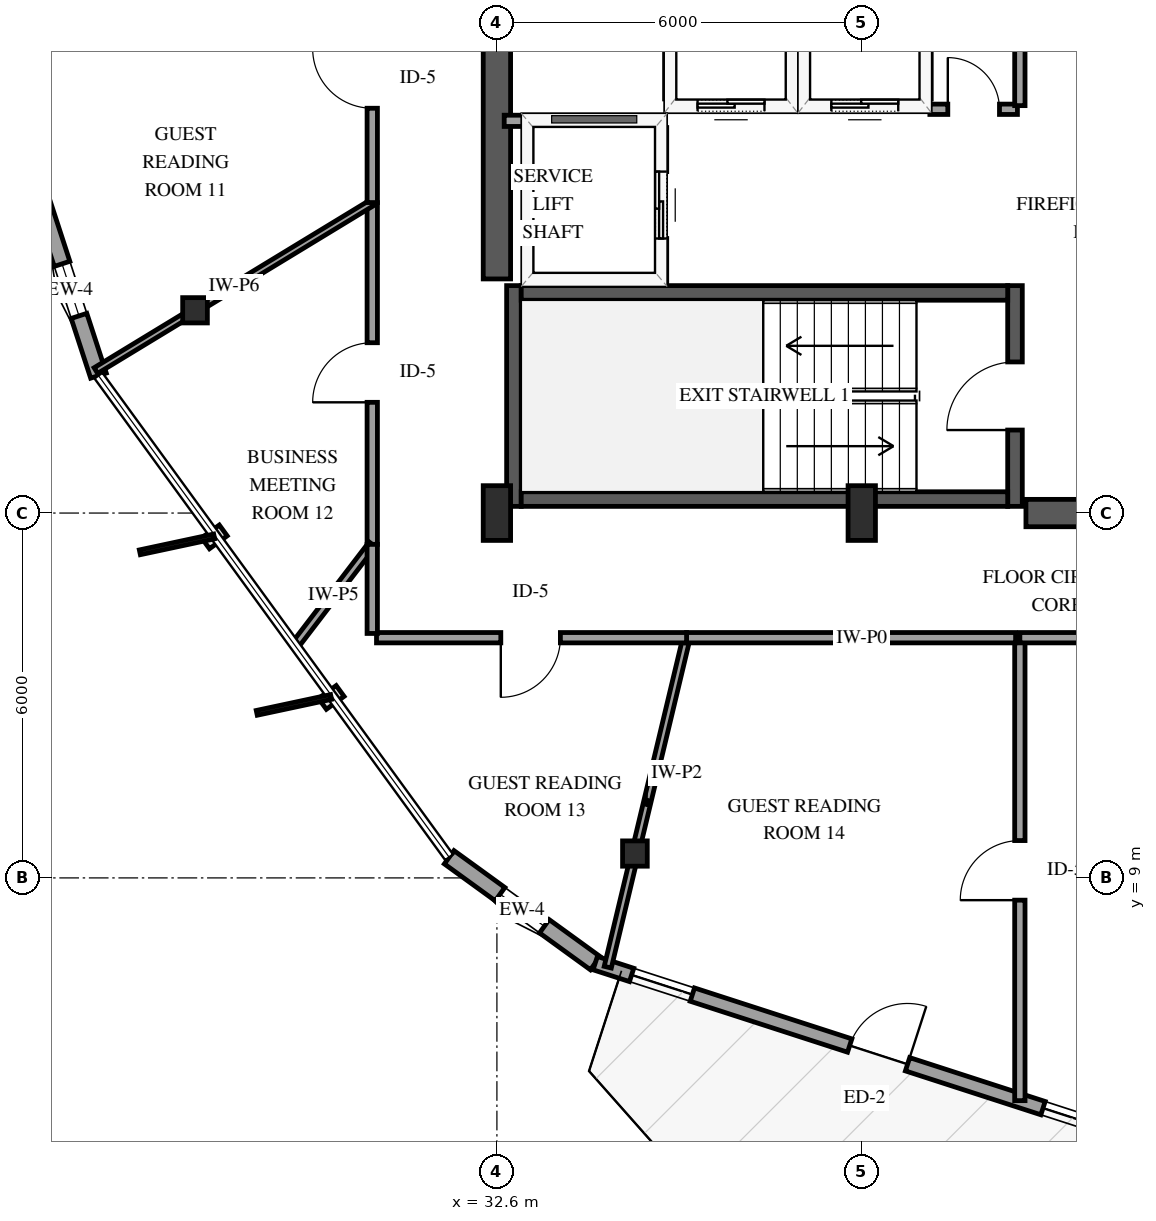
"""IFC4 building model, lengths in metres.
Left out: names, types, materials, properties, quantities, classifications, styles, units other than length and angle.
Written with IfcOpenShell. Run it as: python <this file> out.ifc"""

import sys

from ifc_helpers import new_model, si_unit, direction, frame, frame_2d, origin, origin_2d, place, context, subcontext, project, spatial, rectangle, i_section, extrude, element, fill, save


model = new_model("IFC4")
c1 = context("Model", 3, precision=1e-05, world=origin(), true_north=direction((0.0, 1.0)))
c2 = subcontext(c1, "Body", "Model", "MODEL_VIEW")
j1 = project(units=[si_unit("LENGTHUNIT", "METRE"), si_unit("PLANEANGLEUNIT", "RADIAN")], contexts=[c1])
p1 = place(None, origin())
s1 = spatial("IfcSite", under=j1, at=p1, CompositionType="ELEMENT")
p2 = place(p1, origin())
s2 = spatial("IfcBuilding", under=s1, at=p2, CompositionType="ELEMENT")
p3 = place(p2, frame((0.0, 0.0, 230.2)))
s3 = spatial("IfcBuildingStorey", under=s2, at=p3, CompositionType="ELEMENT", Elevation=230.2)
p4 = place(p3, frame((32.88, 15.11, 0.0), z_axis=(0.0, 0.0, 1.0), x_axis=(0.0, 1.0, 0.0)))
e1 = element("IfcWall", 1, at=p4, inside=s3, PredefinedType="SHEAR", context=c2, shape_type="SweptSolid", body=[
    extrude(rectangle(XDim=3.63, YDim=0.24, at=frame_2d((1.815, 0.0))), origin(), (0.0, 0.0, 1.0), 3.6),
])
p5 = place(p3, frame((41.12, 15.11, 0.0), z_axis=(0.0, 0.0, 1.0), x_axis=(0.0, 1.0, 0.0)))
e2 = element("IfcWall", 2, at=p5, inside=s3, PredefinedType="SHEAR", context=c2, shape_type="SweptSolid", body=[
    extrude(rectangle(XDim=3.63, YDim=0.24, at=frame_2d((1.815, 0.0))), origin(), (0.0, 0.0, 1.0), 3.6),
])
p6 = place(p5, frame((1.255, 0.0, 0.0)))
e3 = element("IfcOpeningElement", 3, at=p6, cuts=e2, PredefinedType="OPENING", context=c2, shape_type="SweptSolid", body=[
    extrude(rectangle(XDim=1.12, YDim=2.15, at=frame_2d((0.56, 1.075))), frame((0.0, 0.13, 0.0), z_axis=(0.0, -1.0, 0.0), x_axis=(1.0, 0.0, 0.0)), (0.0, 0.0, 1.0), 0.26),
])
for number, where, z_axis, x_axis in (
    (4, (33.0, 15.23, 0.0), (0.0, 0.0, 1.0), (1.0, 0.0, 0.0)),
    (5, (33.0, 18.62, 0.0), (0.0, 0.0, 1.0), (1.0, 0.0, 0.0)),
):
    element("IfcWall", number, at=place(p3, frame(where, z_axis=z_axis, x_axis=x_axis)), inside=s3, PredefinedType="SHEAR", context=c2, shape_type="SweptSolid", body=[
        extrude(rectangle(XDim=8.0, YDim=0.24, at=frame_2d((4.0, 0.0))), origin(), (0.0, 0.0, 1.0), 3.6),
    ])
p7 = place(p3, frame((32.6, 18.85, 0.0), z_axis=(0.0, 0.0, 1.0), x_axis=(0.0, 1.0, 0.0)))
e6 = element("IfcWall", 6, at=p7, inside=s3, PredefinedType="SHEAR", context=c2, shape_type="SweptSolid", body=[
    extrude(rectangle(XDim=12.3, YDim=0.45, at=frame_2d((6.15, 0.0))), origin(), (0.0, 0.0, 1.0), 3.6),
])
p8 = place(p3, frame((41.3, 15.0, 0.0), z_axis=(0.0, 0.0, 1.0), x_axis=(1.0, 0.0, 0.0)))
e7 = element("IfcWall", 7, at=p8, inside=s3, PredefinedType="SHEAR", context=c2, shape_type="SweptSolid", body=[
    extrude(rectangle(XDim=2.85, YDim=0.45, at=frame_2d((1.425, 0.0))), origin(), (0.0, 0.0, 1.0), 3.6),
])
for number, where, z_axis, x_axis in (
    (8, (32.6, 15.0, 0.0), (0.0, 0.0, 1.0), (1.0, 0.0, 0.0)),
    (9, (38.6, 15.0, 0.0), (0.0, 0.0, 1.0), (1.0, 0.0, 0.0)),
):
    element("IfcColumn", number, at=place(p3, frame(where, z_axis=z_axis, x_axis=x_axis)), inside=s3, PredefinedType="PILASTER", context=c2, shape_type="SweptSolid", body=[
        extrude(rectangle(XDim=0.45, YDim=0.9, at=origin_2d()), origin(), (0.0, 0.0, 1.0), 3.6),
    ])
for number, where, z_axis, x_axis in (
    (10, (27.635, 18.334, 0.0), (0.0, 0.0, 1.0), (1.0, 0.0, 0.0)),
    (11, (34.87, 9.401, 0.0), (0.0, 0.0, 1.0), (1.0, 0.0, 0.0)),
):
    element("IfcColumn", number, at=place(p3, frame(where, z_axis=z_axis, x_axis=x_axis)), inside=s3, PredefinedType="COLUMN", context=c2, shape_type="SweptSolid", body=[
        extrude(i_section(OverallWidth=0.406, OverallDepth=0.416, WebThickness=0.03, FlangeThickness=0.048, FilletRadius=0.038, at=origin_2d()), origin(), (0.0, 0.0, 1.0), 3.6),
    ])
p9 = place(p3, frame((25.128, 20.08, 0.0), z_axis=(0.0, 0.0, 1.0), x_axis=(0.309949441634, -0.950753040295, 0.0)))
e12 = element("IfcWall", 12, at=p9, inside=s3, PredefinedType="SOLIDWALL", context=c2, shape_type="SweptSolid", body=[
    extrude(rectangle(XDim=2.966, YDim=0.27, at=frame_2d((1.483, 0.0))), origin(), (0.0, 0.0, 1.0), 2.679),
])
p10 = place(p9, frame((1.033, 0.0, 0.75)))
e13 = element("IfcOpeningElement", 13, at=p10, cuts=e12, PredefinedType="OPENING", context=c2, shape_type="SweptSolid", body=[
    extrude(rectangle(XDim=0.9, YDim=1.5, at=frame_2d((0.45, 0.75))), frame((0.0, 0.145, 0.0), z_axis=(0.0, -1.0, 0.0), x_axis=(1.0, 0.0, 0.0)), (0.0, 0.0, 1.0), 0.29),
])
p11 = place(p3, frame((31.815, 9.34, 0.0), z_axis=(0.0, 0.0, 1.0), x_axis=(0.809631952519, -0.586937902558, 0.0)))
e14 = element("IfcWall", 14, at=p11, inside=s3, PredefinedType="SOLIDWALL", context=c2, shape_type="SweptSolid", body=[
    extrude(rectangle(XDim=2.967, YDim=0.27, at=frame_2d((1.483, 0.0))), origin(), (0.0, 0.0, 1.0), 2.679),
])
p12 = place(p11, frame((1.033, 0.0, 0.75)))
e15 = element("IfcOpeningElement", 15, at=p12, cuts=e14, PredefinedType="OPENING", context=c2, shape_type="SweptSolid", body=[
    extrude(rectangle(XDim=0.9, YDim=1.5, at=frame_2d((0.45, 0.75))), frame((0.0, 0.145, 0.0), z_axis=(0.0, -1.0, 0.0), x_axis=(1.0, 0.0, 0.0)), (0.0, 0.0, 1.0), 0.29),
])
p13 = place(p3, frame((34.217, 7.598, 0.0), z_axis=(0.0, 0.0, 1.0), x_axis=(0.951374090692, -0.308037886567, 0.0)))
e16 = element("IfcWall", 16, at=p13, inside=s3, PredefinedType="SOLIDWALL", context=c2, shape_type="SweptSolid", body=[
    extrude(rectangle(XDim=9.798, YDim=0.23, at=frame_2d((4.899, 0.0))), origin(), (0.0, 0.0, 1.0), 2.679),
])
p14 = place(p13, frame((4.399, 0.0, 0.0)))
e17 = element("IfcOpeningElement", 17, at=p14, cuts=e16, PredefinedType="OPENING", context=c2, shape_type="SweptSolid", body=[
    extrude(rectangle(XDim=1.0, YDim=2.15, at=frame_2d((0.5, 1.075))), frame((0.0, 0.125, 0.0), z_axis=(0.0, -1.0, 0.0), x_axis=(1.0, 0.0, 0.0)), (0.0, 0.0, 1.0), 0.25),
])
p15 = place(p13, frame((0.629, 0.0, 0.72)))
e18 = element("IfcOpeningElement", 18, at=p15, cuts=e16, PredefinedType="OPENING", context=c2, shape_type="SweptSolid", body=[
    extrude(rectangle(XDim=1.05, YDim=1.55, at=frame_2d((0.525, 0.775))), frame((0.0, 0.125, 0.0), z_axis=(0.0, -1.0, 0.0), x_axis=(1.0, 0.0, 0.0)), (0.0, 0.0, 1.0), 0.25),
])
p16 = place(p13, frame((7.74, 0.0, 0.72)))
e19 = element("IfcOpeningElement", 19, at=p16, cuts=e16, PredefinedType="OPENING", context=c2, shape_type="SweptSolid", body=[
    extrude(rectangle(XDim=1.05, YDim=1.55, at=frame_2d((0.525, 0.775))), frame((0.0, 0.125, 0.0), z_axis=(0.0, -1.0, 0.0), x_axis=(1.0, 0.0, 0.0)), (0.0, 0.0, 1.0), 0.25),
])
p17 = place(p3, frame((35.45, 21.7, 0.0), z_axis=(0.0, 0.0, 1.0), x_axis=(1.0, 0.0, 0.0)))
e20 = element("IfcWall", 20, at=p17, inside=s3, PredefinedType="SOLIDWALL", context=c2, shape_type="SweptSolid", body=[
    extrude(rectangle(XDim=2.0, YDim=0.185, at=frame_2d((1.0, 0.0))), origin(), (0.0, 0.0, 1.0), 3.3),
])
p18 = place(p17, frame((0.45, 0.0, 0.0)))
e21 = element("IfcOpeningElement", 21, at=p18, cuts=e20, PredefinedType="OPENING", context=c2, shape_type="SweptSolid", body=[
    extrude(rectangle(XDim=1.1, YDim=2.15, at=frame_2d((0.55, 1.075))), frame((0.0, 0.103, 0.0), z_axis=(0.0, -1.0, 0.0), x_axis=(1.0, 0.0, 0.0)), (0.0, 0.0, 1.0), 0.205),
])
for number, where, z_axis, x_axis in (
    (22, (35.45, 21.81, 0.0), (0.0, 0.0, 1.0), (0.0, 1.0, 0.0)),
    (23, (37.45, 21.81, 0.0), (0.0, 0.0, 1.0), (0.0, 1.0, 0.0)),
):
    element("IfcWall", number, at=place(p3, frame(where, z_axis=z_axis, x_axis=x_axis)), inside=s3, PredefinedType="SOLIDWALL", context=c2, shape_type="SweptSolid", body=[
        extrude(rectangle(XDim=2.38, YDim=0.185, at=frame_2d((1.19, 0.0))), origin(), (0.0, 0.0, 1.0), 3.3),
    ])
p19 = place(p3, frame((37.65, 21.7, 0.0), z_axis=(0.0, 0.0, 1.0), x_axis=(1.0, 0.0, 0.0)))
e24 = element("IfcWall", 24, at=p19, inside=s3, PredefinedType="SOLIDWALL", context=c2, shape_type="SweptSolid", body=[
    extrude(rectangle(XDim=2.0, YDim=0.185, at=frame_2d((1.0, 0.0))), origin(), (0.0, 0.0, 1.0), 3.3),
])
p20 = place(p19, frame((0.45, 0.0, 0.0)))
e25 = element("IfcOpeningElement", 25, at=p20, cuts=e24, PredefinedType="OPENING", context=c2, shape_type="SweptSolid", body=[
    extrude(rectangle(XDim=1.1, YDim=2.15, at=frame_2d((0.55, 1.075))), frame((0.0, 0.103, 0.0), z_axis=(0.0, -1.0, 0.0), x_axis=(1.0, 0.0, 0.0)), (0.0, 0.0, 1.0), 0.205),
])
p21 = place(p3, frame((39.65, 21.81, 0.0), z_axis=(0.0, 0.0, 1.0), x_axis=(0.0, 1.0, 0.0)))
e26 = element("IfcWall", 26, at=p21, inside=s3, PredefinedType="SOLIDWALL", context=c2, shape_type="SweptSolid", body=[
    extrude(rectangle(XDim=2.38, YDim=0.185, at=frame_2d((1.19, 0.0))), origin(), (0.0, 0.0, 1.0), 3.3),
])
p22 = place(p3, frame((32.72, 21.45, 0.0), z_axis=(0.0, 0.0, 1.0), x_axis=(1.0, 0.0, 0.0)))
e27 = element("IfcWall", 27, at=p22, inside=s3, PredefinedType="SOLIDWALL", context=c2, shape_type="SweptSolid", body=[
    extrude(rectangle(XDim=2.58, YDim=0.185, at=frame_2d((1.29, 0.0))), origin(), (0.0, 0.0, 1.0), 3.3),
])
p23 = place(p3, frame((35.3, 18.79, 0.0), z_axis=(0.0, 0.0, 1.0), x_axis=(0.0, 1.0, 0.0)))
e28 = element("IfcWall", 28, at=p23, inside=s3, PredefinedType="SOLIDWALL", context=c2, shape_type="SweptSolid", body=[
    extrude(rectangle(XDim=2.55, YDim=0.185, at=frame_2d((1.275, 0.0))), origin(), (0.0, 0.0, 1.0), 3.3),
])
p24 = place(p23, frame((0.725, 0.0, 0.0)))
e29 = element("IfcOpeningElement", 29, at=p24, cuts=e28, PredefinedType="OPENING", context=c2, shape_type="SweptSolid", body=[
    extrude(rectangle(XDim=1.1, YDim=2.15, at=frame_2d((0.55, 1.075))), frame((0.0, 0.103, 0.0), z_axis=(0.0, -1.0, 0.0), x_axis=(1.0, 0.0, 0.0)), (0.0, 0.0, 1.0), 0.205),
])
p25 = place(p3, frame((41.2, 5.337, 0.0), z_axis=(0.0, 0.0, 1.0), x_axis=(0.0, 1.0, 0.0)))
e30 = element("IfcWall", 30, at=p25, inside=s3, PredefinedType="PARTITIONING", context=c2, shape_type="SweptSolid", body=[
    extrude(rectangle(XDim=7.543, YDim=0.17, at=frame_2d((3.771, 0.0))), origin(), (0.0, 0.0, 1.0), 3.3),
])
p26 = place(p25, frame((3.297, 0.0, 0.0)))
e31 = element("IfcOpeningElement", 31, at=p26, cuts=e30, PredefinedType="OPENING", context=c2, shape_type="SweptSolid", body=[
    extrude(rectangle(XDim=0.98, YDim=2.15, at=frame_2d((0.49, 1.075))), frame((0.0, 0.095, 0.0), z_axis=(0.0, -1.0, 0.0), x_axis=(1.0, 0.0, 0.0)), (0.0, 0.0, 1.0), 0.19),
])
p27 = place(p3, frame((30.55, 14.485, 0.0), z_axis=(0.0, 0.0, 1.0), x_axis=(0.0, 1.0, 0.0)))
e32 = element("IfcWall", 32, at=p27, inside=s3, PredefinedType="PARTITIONING", context=c2, shape_type="SweptSolid", body=[
    extrude(rectangle(XDim=5.621, YDim=0.17, at=frame_2d((2.811, 0.0))), origin(), (0.0, 0.0, 1.0), 3.3),
])
p28 = place(p27, frame((2.336, 0.0, 0.0)))
e33 = element("IfcOpeningElement", 33, at=p28, cuts=e32, PredefinedType="OPENING", context=c2, shape_type="SweptSolid", body=[
    extrude(rectangle(XDim=0.98, YDim=2.15, at=frame_2d((0.49, 1.075))), frame((0.0, 0.095, 0.0), z_axis=(0.0, -1.0, 0.0), x_axis=(1.0, 0.0, 0.0)), (0.0, 0.0, 1.0), 0.19),
])
p29 = place(p3, frame((35.719, 12.95, 0.0), z_axis=(0.0, 0.0, 1.0), x_axis=(-0.232623679373, -0.972566822277, 0.0)))
e34 = element("IfcWall", 34, at=p29, inside=s3, PredefinedType="PARTITIONING", context=c2, shape_type="SweptSolid", body=[
    extrude(rectangle(XDim=5.571, YDim=0.12, at=frame_2d((2.785, 0.0))), origin(), (0.0, 0.0, 1.0), 2.595),
])
p30 = place(p3, frame((41.13, 12.95, 0.0), z_axis=(0.0, 0.0, 1.0), x_axis=(-1.0, 0.0, 0.0)))
e35 = element("IfcWall", 35, at=p30, inside=s3, PredefinedType="PARTITIONING", context=c2, shape_type="SweptSolid", body=[
    extrude(rectangle(XDim=5.411, YDim=0.17, at=frame_2d((2.706, 0.0))), origin(), (0.0, 0.0, 1.0), 3.3),
])
p31 = place(p3, frame((46.58, 12.95, 0.0), z_axis=(0.0, 0.0, 1.0), x_axis=(-1.0, 0.0, 0.0)))
e36 = element("IfcWall", 36, at=p31, inside=s3, PredefinedType="PARTITIONING", context=c2, shape_type="SweptSolid", body=[
    extrude(rectangle(XDim=5.38, YDim=0.17, at=frame_2d((2.69, 0.0))), origin(), (0.0, 0.0, 1.0), 3.3),
])
p32 = place(p3, frame((30.55, 20.106, 0.0), z_axis=(0.0, 0.0, 1.0), x_axis=(-0.854505962671, -0.519441584549, 0.0)))
e37 = element("IfcWall", 37, at=p32, inside=s3, PredefinedType="PARTITIONING", context=c2, shape_type="SweptSolid", body=[
    extrude(rectangle(XDim=5.319, YDim=0.11, at=frame_2d((2.66, 0.0))), origin(), (0.0, 0.0, 1.0), 2.678),
])
p33 = place(p3, frame((35.719, 12.95, 0.0), z_axis=(0.0, 0.0, 1.0), x_axis=(-1.0, 0.0, 0.0)))
e38 = element("IfcWall", 38, at=p33, inside=s3, PredefinedType="PARTITIONING", context=c2, shape_type="SweptSolid", body=[
    extrude(rectangle(XDim=5.099, YDim=0.17, at=frame_2d((2.549, 0.0))), origin(), (0.0, 0.0, 1.0), 3.3),
])
p34 = place(p33, frame((2.075, 0.0, 0.0)))
e39 = element("IfcOpeningElement", 39, at=p34, cuts=e38, PredefinedType="OPENING", context=c2, shape_type="SweptSolid", body=[
    extrude(rectangle(XDim=0.98, YDim=2.15, at=frame_2d((0.49, 1.075))), frame((0.0, 0.095, 0.0), z_axis=(0.0, -1.0, 0.0), x_axis=(1.0, 0.0, 0.0)), (0.0, 0.0, 1.0), 0.19),
])
p35 = place(p3, frame((30.55, 20.106, 0.0), z_axis=(0.0, 0.0, 1.0), x_axis=(0.0, 1.0, 0.0)))
e40 = element("IfcWall", 40, at=p35, inside=s3, PredefinedType="PARTITIONING", context=c2, shape_type="SweptSolid", body=[
    extrude(rectangle(XDim=4.053, YDim=0.17, at=frame_2d((2.026, 0.0))), origin(), (0.0, 0.0, 1.0), 3.3),
])
p36 = place(p35, frame((1.551, 0.0, 0.0)))
e41 = element("IfcOpeningElement", 41, at=p36, cuts=e40, PredefinedType="OPENING", context=c2, shape_type="SweptSolid", body=[
    extrude(rectangle(XDim=0.98, YDim=2.15, at=frame_2d((0.49, 1.075))), frame((0.0, 0.095, 0.0), z_axis=(0.0, -1.0, 0.0), x_axis=(1.0, 0.0, 0.0)), (0.0, 0.0, 1.0), 0.19),
])
p37 = place(p3, frame((30.55, 14.485, 0.0), z_axis=(0.0, 0.0, 1.0), x_axis=(-0.607735830279, -0.794139257684, 0.0)))
e42 = element("IfcWall", 42, at=p37, inside=s3, PredefinedType="PARTITIONING", context=c2, shape_type="SweptSolid", body=[
    extrude(rectangle(XDim=2.093, YDim=0.13, at=frame_2d((1.046, 0.0))), origin(), (0.0, 0.0, 1.0), 3.3),
])
p38 = place(p3, frame((30.55, 13.02, 0.0), z_axis=(0.0, 0.0, 1.0), x_axis=(0.0, 1.0, 0.0)))
e43 = element("IfcWall", 43, at=p38, inside=s3, PredefinedType="PARTITIONING", context=c2, shape_type="SweptSolid", body=[
    extrude(rectangle(XDim=1.465, YDim=0.17, at=frame_2d((0.732, 0.0))), origin(), (0.0, 0.0, 1.0), 3.3),
])
p39 = place(p3, frame((39.72, 21.64, 0.0), z_axis=(0.0, 0.0, 1.0), x_axis=(1.0, 0.0, 0.0)))
e44 = element("IfcWall", 44, at=p39, inside=s3, PredefinedType="PARTITIONING", context=c2, shape_type="SweptSolid", body=[
    extrude(rectangle(XDim=1.44, YDim=0.17, at=frame_2d((0.72, 0.0))), origin(), (0.0, 0.0, 1.0), 3.3),
])
p40 = place(p39, frame((0.295, 0.0, 0.0)))
e45 = element("IfcOpeningElement", 45, at=p40, cuts=e44, PredefinedType="OPENING", context=c2, shape_type="SweptSolid", body=[
    extrude(rectangle(XDim=0.85, YDim=2.1, at=frame_2d((0.425, 1.05))), frame((0.0, 0.095, 0.0), z_axis=(0.0, -1.0, 0.0), x_axis=(1.0, 0.0, 0.0)), (0.0, 0.0, 1.0), 0.19),
])
p41 = place(p3, frame((41.2, 21.7, 0.0), z_axis=(0.0, 0.0, 1.0), x_axis=(0.0, 1.0, 0.0)))
e46 = element("IfcWall", 46, at=p41, inside=s3, PredefinedType="PARTITIONING", context=c2, shape_type="SweptSolid", body=[
    extrude(rectangle(XDim=1.12, YDim=0.17, at=frame_2d((0.56, 0.0))), origin(), (0.0, 0.0, 1.0), 3.3),
])
p42 = place(p10, origin())
e47 = element("IfcWindow", 47, at=p42, inside=s3, PartitioningType="SINGLE_PANEL", PredefinedType="WINDOW", context=c2, shape_type="SweptSolid", body=[
    extrude(rectangle(XDim=0.9, YDim=1.5, at=frame_2d((0.45, 0.75))), frame((0.0, 0.03, 0.0), z_axis=(0.0, -1.0, 0.0), x_axis=(1.0, 0.0, 0.0)), (0.0, 0.0, 1.0), 0.06),
])
fill(e13, e47)
p43 = place(p12, origin())
e48 = element("IfcWindow", 48, at=p43, inside=s3, PartitioningType="SINGLE_PANEL", PredefinedType="WINDOW", context=c2, shape_type="SweptSolid", body=[
    extrude(rectangle(XDim=0.9, YDim=1.5, at=frame_2d((0.45, 0.75))), frame((0.0, 0.03, 0.0), z_axis=(0.0, -1.0, 0.0), x_axis=(1.0, 0.0, 0.0)), (0.0, 0.0, 1.0), 0.06),
])
fill(e15, e48)
p44 = place(p14, origin())
e49 = element("IfcDoor", 49, at=p44, inside=s3, OperationType="SINGLE_SWING_RIGHT", PredefinedType="DOOR", context=c2, shape_type="SweptSolid", body=[
    extrude(rectangle(XDim=1.0, YDim=2.15, at=frame_2d((0.5, 1.075))), frame((0.0, 0.025, 0.0), z_axis=(0.0, -1.0, 0.0), x_axis=(1.0, 0.0, 0.0)), (0.0, 0.0, 1.0), 0.05),
])
fill(e17, e49)
p45 = place(p15, origin())
e50 = element("IfcWindow", 50, at=p45, inside=s3, PartitioningType="SINGLE_PANEL", PredefinedType="WINDOW", context=c2, shape_type="SweptSolid", body=[
    extrude(rectangle(XDim=1.05, YDim=1.55, at=frame_2d((0.525, 0.775))), frame((0.0, 0.03, 0.0), z_axis=(0.0, -1.0, 0.0), x_axis=(1.0, 0.0, 0.0)), (0.0, 0.0, 1.0), 0.06),
])
fill(e18, e50)
p46 = place(p16, origin())
e51 = element("IfcWindow", 51, at=p46, inside=s3, PartitioningType="SINGLE_PANEL", PredefinedType="WINDOW", context=c2, shape_type="SweptSolid", body=[
    extrude(rectangle(XDim=1.05, YDim=1.55, at=frame_2d((0.525, 0.775))), frame((0.0, 0.03, 0.0), z_axis=(0.0, -1.0, 0.0), x_axis=(1.0, 0.0, 0.0)), (0.0, 0.0, 1.0), 0.06),
])
fill(e19, e51)
p47 = place(p18, origin())
e52 = element("IfcDoor", 52, at=p47, inside=s3, OperationType="SLIDING_TO_LEFT", PredefinedType="DOOR", context=c2, shape_type="SweptSolid", body=[
    extrude(rectangle(XDim=1.1, YDim=2.15, at=frame_2d((0.55, 1.075))), frame((0.0, 0.025, 0.0), z_axis=(0.0, -1.0, 0.0), x_axis=(1.0, 0.0, 0.0)), (0.0, 0.0, 1.0), 0.05),
])
fill(e21, e52)
p48 = place(p20, origin())
e53 = element("IfcDoor", 53, at=p48, inside=s3, OperationType="SLIDING_TO_LEFT", PredefinedType="DOOR", context=c2, shape_type="SweptSolid", body=[
    extrude(rectangle(XDim=1.1, YDim=2.15, at=frame_2d((0.55, 1.075))), frame((0.0, 0.025, 0.0), z_axis=(0.0, -1.0, 0.0), x_axis=(1.0, 0.0, 0.0)), (0.0, 0.0, 1.0), 0.05),
])
fill(e25, e53)
p49 = place(p24, origin())
e54 = element("IfcDoor", 54, at=p49, inside=s3, OperationType="SLIDING_TO_LEFT", PredefinedType="DOOR", context=c2, shape_type="SweptSolid", body=[
    extrude(rectangle(XDim=1.1, YDim=2.15, at=frame_2d((0.55, 1.075))), frame((0.0, 0.025, 0.0), z_axis=(0.0, -1.0, 0.0), x_axis=(1.0, 0.0, 0.0)), (0.0, 0.0, 1.0), 0.05),
])
fill(e29, e54)
p50 = place(p6, origin())
e55 = element("IfcDoor", 55, at=p50, inside=s3, OperationType="SINGLE_SWING_LEFT", PredefinedType="DOOR", context=c2, shape_type="SweptSolid", body=[
    extrude(rectangle(XDim=1.12, YDim=2.15, at=frame_2d((0.56, 1.075))), frame((0.0, 0.025, 0.0), z_axis=(0.0, -1.0, 0.0), x_axis=(1.0, 0.0, 0.0)), (0.0, 0.0, 1.0), 0.05),
])
fill(e3, e55)
p51 = place(p26, origin())
e56 = element("IfcDoor", 56, at=p51, inside=s3, OperationType="SINGLE_SWING_LEFT", PredefinedType="DOOR", context=c2, shape_type="SweptSolid", body=[
    extrude(rectangle(XDim=0.98, YDim=2.15, at=frame_2d((0.49, 1.075))), frame((0.0, 0.025, 0.0), z_axis=(0.0, -1.0, 0.0), x_axis=(1.0, 0.0, 0.0)), (0.0, 0.0, 1.0), 0.05),
])
fill(e31, e56)
p52 = place(p28, origin())
e57 = element("IfcDoor", 57, at=p52, inside=s3, OperationType="SINGLE_SWING_LEFT", PredefinedType="DOOR", context=c2, shape_type="SweptSolid", body=[
    extrude(rectangle(XDim=0.98, YDim=2.15, at=frame_2d((0.49, 1.075))), frame((0.0, 0.025, 0.0), z_axis=(0.0, -1.0, 0.0), x_axis=(1.0, 0.0, 0.0)), (0.0, 0.0, 1.0), 0.05),
])
fill(e33, e57)
p53 = place(p34, origin())
e58 = element("IfcDoor", 58, at=p53, inside=s3, OperationType="SINGLE_SWING_RIGHT", PredefinedType="DOOR", context=c2, shape_type="SweptSolid", body=[
    extrude(rectangle(XDim=0.98, YDim=2.15, at=frame_2d((0.49, 1.075))), frame((0.0, 0.025, 0.0), z_axis=(0.0, -1.0, 0.0), x_axis=(1.0, 0.0, 0.0)), (0.0, 0.0, 1.0), 0.05),
])
fill(e39, e58)
p54 = place(p36, origin())
e59 = element("IfcDoor", 59, at=p54, inside=s3, OperationType="SINGLE_SWING_RIGHT", PredefinedType="DOOR", context=c2, shape_type="SweptSolid", body=[
    extrude(rectangle(XDim=0.98, YDim=2.15, at=frame_2d((0.49, 1.075))), frame((0.0, 0.025, 0.0), z_axis=(0.0, -1.0, 0.0), x_axis=(1.0, 0.0, 0.0)), (0.0, 0.0, 1.0), 0.05),
])
fill(e41, e59)
p55 = place(p40, origin())
e60 = element("IfcDoor", 60, at=p55, inside=s3, OperationType="SINGLE_SWING_LEFT", PredefinedType="DOOR", context=c2, shape_type="SweptSolid", body=[
    extrude(rectangle(XDim=0.85, YDim=2.1, at=frame_2d((0.425, 1.05))), frame((0.0, 0.025, 0.0), z_axis=(0.0, -1.0, 0.0), x_axis=(1.0, 0.0, 0.0)), (0.0, 0.0, 1.0), 0.05),
])
fill(e45, e60)
save(model, sys.argv[1])
